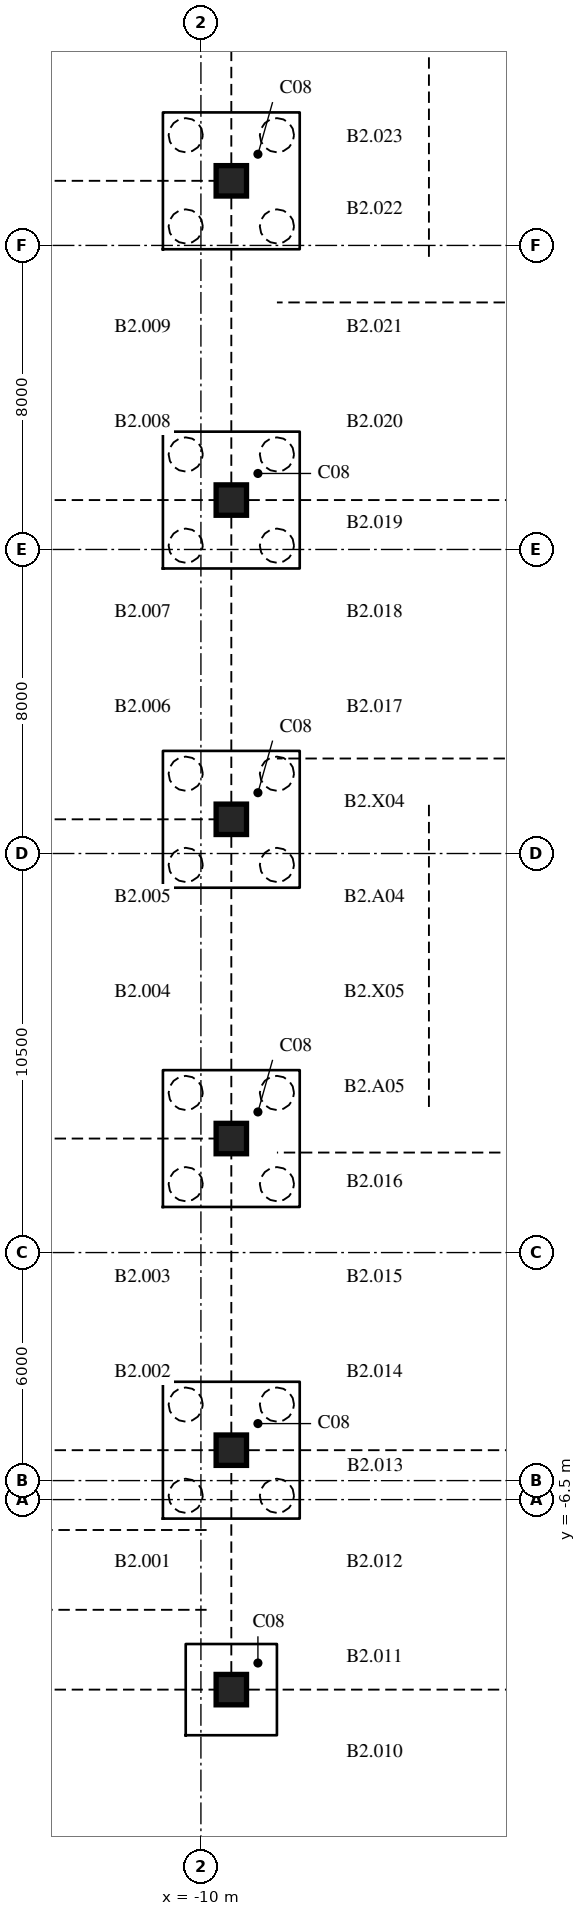
"""IFC4 building model, lengths in metres.
Left out: names, types, materials, properties, quantities, classifications, styles, units other than length and angle.
Written with IfcOpenShell. Run it as: python <this file> out.ifc"""

import sys

from ifc_helpers import new_model, si_unit, direction, frame, origin, origin_2d, place, context, subcontext, project, spatial, rectangle, extrude, element, save


model = new_model("IFC4")
c1 = context("Model", 3, precision=1e-05, world=origin(), true_north=direction((0.0, 1.0)))
c2 = subcontext(c1, "Body", "Model", "MODEL_VIEW")
j1 = project(units=[si_unit("LENGTHUNIT", "METRE"), si_unit("PLANEANGLEUNIT", "RADIAN")], contexts=[c1])
p1 = place(None, origin())
s1 = spatial("IfcSite", under=j1, at=p1, CompositionType="ELEMENT")
p2 = place(p1, origin())
s2 = spatial("IfcBuilding", under=s1, at=p2, CompositionType="ELEMENT")
p3 = place(p2, frame((0.0, 0.0, -7.5)))
s3 = spatial("IfcBuildingStorey", under=s2, at=p3, CompositionType="ELEMENT", Elevation=-7.5)
for number, where, z_axis, x_axis in (
    (1, (-9.2, -5.2, -0.6), (0.0, 0.0, 1.0), (1.0, 0.0, 0.0)),
    (2, (-9.2, 3.0, -0.6), (0.0, 0.0, 1.0), (1.0, 0.0, 0.0)),
    (3, (-9.2, 11.4, -0.6), (0.0, 0.0, 1.0), (1.0, 0.0, 0.0)),
    (4, (-9.2, 19.8, -0.6), (0.0, 0.0, 1.0), (1.0, 0.0, 0.0)),
    (5, (-9.2, 28.2, -0.6), (0.0, 0.0, 1.0), (1.0, 0.0, 0.0)),
    (6, (-9.2, -11.5, -0.6), (0.0, 0.0, 1.0), (1.0, 0.0, 0.0)),
):
    element("IfcColumn", number, at=place(p3, frame(where, z_axis=z_axis, x_axis=x_axis)), inside=s3, PredefinedType="COLUMN", context=c2, shape_type="SweptSolid", body=[
        extrude(rectangle(XDim=0.8, YDim=0.8, at=origin_2d()), origin(), (0.0, 0.0, 1.0), 4.1),
    ])
save(model, sys.argv[1])
